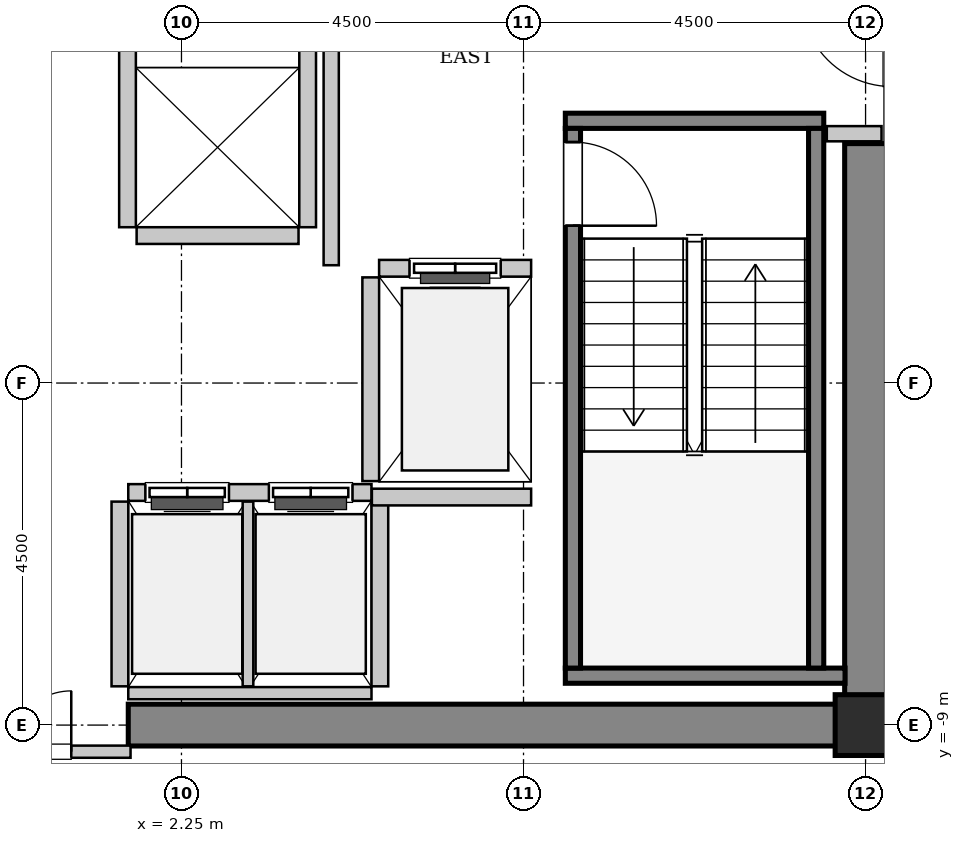
"""IFC4 building model, lengths in metres.
Left out: names, types, materials, properties, quantities, classifications, styles, units other than length and angle.
Written with IfcOpenShell. Run it as: python <this file> out.ifc"""

import sys

from ifc_helpers import new_model, si_unit, direction, frame, frame_2d, origin, origin_2d, place, context, subcontext, project, spatial, rectangle, hollow_rectangle, extrude, source, transform, mapped, element, fill, save


model = new_model("IFC4")
c1 = context("Model", 3, precision=1e-05, world=origin(), true_north=direction((0.0, 1.0)))
c2 = subcontext(c1, "Body", "Model", "MODEL_VIEW")
j1 = project(units=[si_unit("LENGTHUNIT", "METRE"), si_unit("PLANEANGLEUNIT", "RADIAN")], contexts=[c1])
p1 = place(None, origin())
s1 = spatial("IfcSite", under=j1, at=p1, CompositionType="ELEMENT")
p2 = place(p1, origin())
s2 = spatial("IfcBuilding", under=s1, at=p2, CompositionType="ELEMENT")
p3 = place(p2, frame((0.0, 0.0, 190.6)))
s3 = spatial("IfcBuildingStorey", under=s2, at=p3, CompositionType="ELEMENT", Elevation=190.6)
m1 = source(origin(), c2, "Body", "SweptSolid", [
    extrude(rectangle(XDim=9.975, YDim=0.55, at=frame_2d((4.987, 0.0))), origin(), (0.0, 0.0, 1.0), 3.8),
])
p4 = place(p3, frame((1.55, -9.0, 0.0), z_axis=(0.0, 0.0, 1.0), x_axis=(1.0, 0.0, 0.0)))
e1 = element("IfcWall", 1, at=p4, inside=s3, PredefinedType="SHEAR", context=c2, shape_type="MappedRepresentation", body=[
    mapped(m1, transform((0.0, 0.0, 0.0), x_axis=(1.0, 0.0, 0.0), y_axis=(0.0, 1.0, 0.0), z_axis=(0.0, 0.0, 1.0), scale=1.0)),
])
m2 = source(origin(), c2, "Body", "SweptSolid", [
    extrude(rectangle(XDim=7.375, YDim=0.55, at=frame_2d((3.688, 0.0))), origin(), (0.0, 0.0, 1.0), 3.8),
])
p5 = place(p3, frame((11.25, -8.725, 0.0), z_axis=(0.0, 0.0, 1.0), x_axis=(0.0, 1.0, 0.0)))
e2 = element("IfcWall", 2, at=p5, inside=s3, PredefinedType="SHEAR", context=c2, shape_type="MappedRepresentation", body=[
    mapped(m2, transform((0.0, 0.0, 0.0), x_axis=(1.0, 0.0, 0.0), y_axis=(0.0, 1.0, 0.0), z_axis=(0.0, 0.0, 1.0), scale=1.0)),
])
m3 = source(origin(), c2, "Body", "SweptSolid", [
    extrude(hollow_rectangle(XDim=0.8, YDim=0.8, WallThickness=0.04, InnerFilletRadius=0.04, OuterFilletRadius=0.08, at=origin_2d()), origin(), (0.0, 0.0, 1.0), 3.8),
])
p6 = place(p3, frame((11.25, -9.0, 0.0), z_axis=(0.0, 0.0, 1.0), x_axis=(1.0, 0.0, 0.0)))
e3 = element("IfcColumn", 3, at=p6, inside=s3, PredefinedType="COLUMN", context=c2, shape_type="MappedRepresentation", body=[
    mapped(m3, transform((0.0, 0.0, 0.0), x_axis=(1.0, 0.0, 0.0), y_axis=(0.0, 1.0, 0.0), z_axis=(0.0, 0.0, 1.0), scale=1.0)),
])
m4 = source(origin(), c2, "Body", "SweptSolid", [
    extrude(rectangle(XDim=3.4, YDim=0.2, at=frame_2d((1.7, 0.0))), origin(), (0.0, 0.0, 1.0), 3.8),
])
p7 = place(p3, frame((7.3, -1.05, 0.0), z_axis=(0.0, 0.0, 1.0), x_axis=(1.0, 0.0, 0.0)))
e4 = element("IfcWall", 4, at=p7, inside=s3, PredefinedType="SOLIDWALL", context=c2, shape_type="MappedRepresentation", body=[
    mapped(m4, transform((0.0, 0.0, 0.0), x_axis=(1.0, 0.0, 0.0), y_axis=(0.0, 1.0, 0.0), z_axis=(0.0, 0.0, 1.0), scale=1.0)),
])
m5 = source(origin(), c2, "Body", "SweptSolid", [
    extrude(rectangle(XDim=3.68, YDim=0.2, at=frame_2d((1.84, 0.0))), origin(), (0.0, 0.0, 1.0), 3.8),
])
p8 = place(p3, frame((7.3, -8.35, 0.0), z_axis=(0.0, 0.0, 1.0), x_axis=(1.0, 0.0, 0.0)))
e5 = element("IfcWall", 5, at=p8, inside=s3, PredefinedType="SOLIDWALL", context=c2, shape_type="MappedRepresentation", body=[
    mapped(m5, transform((0.0, 0.0, 0.0), x_axis=(1.0, 0.0, 0.0), y_axis=(0.0, 1.0, 0.0), z_axis=(0.0, 0.0, 1.0), scale=1.0)),
])
m6 = source(origin(), c2, "Body", "SweptSolid", [
    extrude(rectangle(XDim=7.1, YDim=0.2, at=frame_2d((3.55, 0.0))), origin(), (0.0, 0.0, 1.0), 3.8),
])
p9 = place(p3, frame((7.4, -1.15, 0.0), z_axis=(0.0, 0.0, 1.0), x_axis=(0.0, -1.0, 0.0)))
e6 = element("IfcWall", 6, at=p9, inside=s3, PredefinedType="SOLIDWALL", context=c2, shape_type="MappedRepresentation", body=[
    mapped(m6, transform((0.0, 0.0, 0.0), x_axis=(1.0, 0.0, 0.0), y_axis=(0.0, 1.0, 0.0), z_axis=(0.0, 0.0, 1.0), scale=1.0)),
])
p10 = place(p9, frame((0.18, 0.0, 0.0)))
e7 = element("IfcOpeningElement", 7, at=p10, cuts=e6, PredefinedType="OPENING", context=c2, shape_type="SweptSolid", body=[
    extrude(rectangle(XDim=1.1, YDim=2.15, at=frame_2d((0.55, 1.075))), frame((0.0, 0.11, 0.0), z_axis=(0.0, -1.0, 0.0), x_axis=(1.0, 0.0, 0.0)), (0.0, 0.0, 1.0), 0.22),
])
p11 = place(p3, frame((10.6, -1.15, 0.0), z_axis=(0.0, 0.0, 1.0), x_axis=(0.0, -1.0, 0.0)))
e8 = element("IfcWall", 8, at=p11, inside=s3, PredefinedType="SOLIDWALL", context=c2, shape_type="MappedRepresentation", body=[
    mapped(m6, transform((0.0, 0.0, 0.0), x_axis=(1.0, 0.0, 0.0), y_axis=(0.0, 1.0, 0.0), z_axis=(0.0, 0.0, 1.0), scale=1.0)),
])
m7 = source(origin(), c2, "Body", "SweptSolid", [
    extrude(rectangle(XDim=2.0, YDim=0.22, at=frame_2d((1.0, 0.0))), origin(), (0.0, 0.0, 1.0), 3.535),
])
p12 = place(p3, frame((6.85, -2.99, 0.0), z_axis=(0.0, 0.0, 1.0), x_axis=(-1.0, 0.0, 0.0)))
e9 = element("IfcWall", 9, at=p12, inside=s3, PredefinedType="SOLIDWALL", context=c2, shape_type="MappedRepresentation", body=[
    mapped(m7, transform((0.0, 0.0, 0.0), x_axis=(1.0, 0.0, 0.0), y_axis=(0.0, 1.0, 0.0), z_axis=(0.0, 0.0, 1.0), scale=1.0)),
])
p13 = place(p12, frame((0.4, 0.0, 0.0)))
e10 = element("IfcOpeningElement", 10, at=p13, cuts=e9, PredefinedType="OPENING", context=c2, shape_type="SweptSolid", body=[
    extrude(rectangle(XDim=1.2, YDim=2.2, at=frame_2d((0.6, 1.1))), frame((0.0, 0.12, 0.0), z_axis=(0.0, -1.0, 0.0), x_axis=(1.0, 0.0, 0.0)), (0.0, 0.0, 1.0), 0.24),
])
m8 = source(origin(), c2, "Body", "SweptSolid", [
    extrude(rectangle(XDim=2.68, YDim=0.22, at=frame_2d((1.34, 0.0))), origin(), (0.0, 0.0, 1.0), 3.535),
])
p14 = place(p3, frame((4.74, -3.11, 0.0), z_axis=(0.0, 0.0, 1.0), x_axis=(0.0, -1.0, 0.0)))
e11 = element("IfcWall", 11, at=p14, inside=s3, PredefinedType="SOLIDWALL", context=c2, shape_type="MappedRepresentation", body=[
    mapped(m8, transform((0.0, 0.0, 0.0), x_axis=(1.0, 0.0, 0.0), y_axis=(0.0, 1.0, 0.0), z_axis=(0.0, 0.0, 1.0), scale=1.0)),
])
m9 = source(origin(), c2, "Body", "SweptSolid", [
    extrude(rectangle(XDim=3.2, YDim=0.22, at=frame_2d((1.6, 0.0))), origin(), (0.0, 0.0, 1.0), 3.535),
])
p15 = place(p3, frame((4.75, -5.94, 0.0), z_axis=(0.0, 0.0, 1.0), x_axis=(-1.0, 0.0, 0.0)))
e12 = element("IfcWall", 12, at=p15, inside=s3, PredefinedType="SOLIDWALL", context=c2, shape_type="MappedRepresentation", body=[
    mapped(m9, transform((0.0, 0.0, 0.0), x_axis=(1.0, 0.0, 0.0), y_axis=(0.0, 1.0, 0.0), z_axis=(0.0, 0.0, 1.0), scale=1.0)),
])
p16 = place(p15, frame((1.875, 0.0, 0.0)))
e13 = element("IfcOpeningElement", 13, at=p16, cuts=e12, PredefinedType="OPENING", context=c2, shape_type="SweptSolid", body=[
    extrude(rectangle(XDim=1.1, YDim=2.2, at=frame_2d((0.55, 1.1))), frame((0.0, 0.12, 0.0), z_axis=(0.0, -1.0, 0.0), x_axis=(1.0, 0.0, 0.0)), (0.0, 0.0, 1.0), 0.24),
])
p17 = place(p15, frame((0.25, 0.0, 0.0)))
e14 = element("IfcOpeningElement", 14, at=p17, cuts=e12, PredefinedType="OPENING", context=c2, shape_type="SweptSolid", body=[
    extrude(rectangle(XDim=1.1, YDim=2.2, at=frame_2d((0.55, 1.1))), frame((0.0, 0.12, 0.0), z_axis=(0.0, -1.0, 0.0), x_axis=(1.0, 0.0, 0.0)), (0.0, 0.0, 1.0), 0.24),
])
m10 = source(origin(), c2, "Body", "SweptSolid", [
    extrude(rectangle(XDim=3.2, YDim=0.16, at=frame_2d((1.6, 0.0))), origin(), (0.0, 0.0, 1.0), 2.425),
])
p18 = place(p3, frame((1.55, -8.58, 0.0), z_axis=(0.0, 0.0, 1.0), x_axis=(1.0, 0.0, 0.0)))
e15 = element("IfcWall", 15, at=p18, inside=s3, PredefinedType="PARTITIONING", context=c2, shape_type="MappedRepresentation", body=[
    mapped(m10, transform((0.0, 0.0, 0.0), x_axis=(1.0, 0.0, 0.0), y_axis=(0.0, 1.0, 0.0), z_axis=(0.0, 0.0, 1.0), scale=1.0)),
])
m11 = source(origin(), c2, "Body", "SweptSolid", [
    extrude(rectangle(XDim=2.43, YDim=0.22, at=frame_2d((1.215, 0.0))), origin(), (0.0, 0.0, 1.0), 3.535),
])
p19 = place(p3, frame((1.44, -6.06, 0.0), z_axis=(0.0, 0.0, 1.0), x_axis=(0.0, -1.0, 0.0)))
e16 = element("IfcWall", 16, at=p19, inside=s3, PredefinedType="SOLIDWALL", context=c2, shape_type="MappedRepresentation", body=[
    mapped(m11, transform((0.0, 0.0, 0.0), x_axis=(1.0, 0.0, 0.0), y_axis=(0.0, 1.0, 0.0), z_axis=(0.0, 0.0, 1.0), scale=1.0)),
])
m12 = source(origin(), c2, "Body", "SweptSolid", [
    extrude(rectangle(XDim=2.43, YDim=0.14, at=frame_2d((1.215, 0.0))), origin(), (0.0, 0.0, 1.0), 3.535),
])
p20 = place(p3, frame((3.125, -8.49, 0.0), z_axis=(0.0, 0.0, 1.0), x_axis=(0.0, 1.0, 0.0)))
e17 = element("IfcWall", 17, at=p20, inside=s3, PredefinedType="PARTITIONING", context=c2, shape_type="MappedRepresentation", body=[
    mapped(m12, transform((0.0, 0.0, 0.0), x_axis=(1.0, 0.0, 0.0), y_axis=(0.0, 1.0, 0.0), z_axis=(0.0, 0.0, 1.0), scale=1.0)),
])
p21 = place(p3, frame((4.86, -8.49, 0.0), z_axis=(0.0, 0.0, 1.0), x_axis=(0.0, 1.0, 0.0)))
e18 = element("IfcWall", 18, at=p21, inside=s3, PredefinedType="SOLIDWALL", context=c2, shape_type="MappedRepresentation", body=[
    mapped(m11, transform((0.0, 0.0, 0.0), x_axis=(1.0, 0.0, 0.0), y_axis=(0.0, 1.0, 0.0), z_axis=(0.0, 0.0, 1.0), scale=1.0)),
])
m13 = source(origin(), c2, "Body", "SweptSolid", [
    extrude(rectangle(XDim=4.9, YDim=0.22, at=frame_2d((2.45, 0.0))), origin(), (0.0, 0.0, 1.0), 3.535),
])
for number, where, z_axis, x_axis in (
    (19, (1.54, 2.45, 0.0), (0.0, 0.0, 1.0), (0.0, -1.0, 0.0)),
    (20, (3.91, -2.45, 0.0), (0.0, 0.0, 1.0), (0.0, 1.0, 0.0)),
):
    element("IfcWall", number, at=place(p3, frame(where, z_axis=z_axis, x_axis=x_axis)), inside=s3, PredefinedType="SOLIDWALL", context=c2, shape_type="MappedRepresentation", body=[
        mapped(m13, transform((0.0, 0.0, 0.0), x_axis=(1.0, 0.0, 0.0), y_axis=(0.0, 1.0, 0.0), z_axis=(0.0, 0.0, 1.0), scale=1.0)),
    ])
m14 = source(origin(), c2, "Body", "SweptSolid", [
    extrude(rectangle(XDim=2.13, YDim=0.22, at=frame_2d((1.065, 0.0))), origin(), (0.0, 0.0, 1.0), 3.535),
])
p22 = place(p3, frame((1.66, -2.56, 0.0), z_axis=(0.0, 0.0, 1.0), x_axis=(1.0, 0.0, 0.0)))
e21 = element("IfcWall", 21, at=p22, inside=s3, PredefinedType="SOLIDWALL", context=c2, shape_type="MappedRepresentation", body=[
    mapped(m14, transform((0.0, 0.0, 0.0), x_axis=(1.0, 0.0, 0.0), y_axis=(0.0, 1.0, 0.0), z_axis=(0.0, 0.0, 1.0), scale=1.0)),
])
m15 = source(origin(), c2, "Body", "SweptSolid", [
    extrude(rectangle(XDim=2.095, YDim=0.22, at=frame_2d((1.048, 0.0))), origin(), (0.0, 0.0, 1.0), 3.535),
])
p23 = place(p3, frame((4.755, -6.0, 0.0), z_axis=(0.0, 0.0, 1.0), x_axis=(1.0, 0.0, 0.0)))
e22 = element("IfcWall", 22, at=p23, inside=s3, PredefinedType="SOLIDWALL", context=c2, shape_type="MappedRepresentation", body=[
    mapped(m15, transform((0.0, 0.0, 0.0), x_axis=(1.0, 0.0, 0.0), y_axis=(0.0, 1.0, 0.0), z_axis=(0.0, 0.0, 1.0), scale=1.0)),
])
m16 = source(origin(), c2, "Body", "SweptSolid", [
    extrude(rectangle(XDim=5.9, YDim=0.2, at=frame_2d((2.95, 0.0))), origin(), (0.0, 0.0, 1.0), 3.535),
])
p24 = place(p3, frame((4.22, -2.95, 0.0), z_axis=(0.0, 0.0, 1.0), x_axis=(0.0, 1.0, 0.0)))
e23 = element("IfcWall", 23, at=p24, inside=s3, PredefinedType="PARTITIONING", context=c2, shape_type="MappedRepresentation", body=[
    mapped(m16, transform((0.0, 0.0, 0.0), x_axis=(1.0, 0.0, 0.0), y_axis=(0.0, 1.0, 0.0), z_axis=(0.0, 0.0, 1.0), scale=1.0)),
])
m17 = source(origin(), c2, "Body", "SweptSolid", [
    extrude(rectangle(XDim=0.72, YDim=0.2, at=frame_2d((0.36, 0.0))), origin(), (0.0, 0.0, 1.0), 3.535),
])
p25 = place(p3, frame((10.74, -1.22, 0.0), z_axis=(0.0, 0.0, 1.0), x_axis=(1.0, 0.0, 0.0)))
e24 = element("IfcWall", 24, at=p25, inside=s3, PredefinedType="PARTITIONING", context=c2, shape_type="MappedRepresentation", body=[
    mapped(m17, transform((0.0, 0.0, 0.0), x_axis=(1.0, 0.0, 0.0), y_axis=(0.0, 1.0, 0.0), z_axis=(0.0, 0.0, 1.0), scale=1.0)),
])
m18 = source(origin(), c2, "Body", "SweptSolid", [
    extrude(rectangle(XDim=3.16, YDim=0.16, at=frame_2d((1.58, 0.0))), origin(), (0.0, 0.0, 1.0), 2.425),
])
p26 = place(p3, frame((-1.58, -9.35, 0.0), z_axis=(0.0, 0.0, 1.0), x_axis=(1.0, 0.0, 0.0)))
e25 = element("IfcWall", 25, at=p26, inside=s3, PredefinedType="PARTITIONING", context=c2, shape_type="MappedRepresentation", body=[
    mapped(m18, transform((0.0, 0.0, 0.0), x_axis=(1.0, 0.0, 0.0), y_axis=(0.0, 1.0, 0.0), z_axis=(0.0, 0.0, 1.0), scale=1.0)),
])
p27 = place(p26, frame((0.78, 0.0, 0.0)))
e26 = element("IfcOpeningElement", 26, at=p27, cuts=e25, PredefinedType="OPENING", context=c2, shape_type="SweptSolid", body=[
    extrude(rectangle(XDim=1.6, YDim=2.3, at=frame_2d((0.8, 1.15))), frame((0.0, 0.09, 0.0), z_axis=(0.0, -1.0, 0.0), x_axis=(1.0, 0.0, 0.0)), (0.0, 0.0, 1.0), 0.18),
])
m19 = source(origin(), c2, "Body", "SweptSolid", [
    extrude(rectangle(XDim=1.1, YDim=2.15, at=frame_2d((0.55, 1.075))), frame((0.0, 0.025, 0.0), z_axis=(0.0, -1.0, 0.0), x_axis=(1.0, 0.0, 0.0)), (0.0, 0.0, 1.0), 0.05),
])
p28 = place(p10, origin())
e27 = element("IfcDoor", 27, at=p28, inside=s3, OperationType="SINGLE_SWING_RIGHT", PredefinedType="DOOR", context=c2, shape_type="MappedRepresentation", body=[
    mapped(m19, transform((0.0, 0.0, 0.0), x_axis=(1.0, 0.0, 0.0), y_axis=(0.0, 1.0, 0.0), z_axis=(0.0, 0.0, 1.0), scale=1.0)),
])
fill(e7, e27)
m20 = source(origin(), c2, "Body", "SweptSolid", [
    extrude(rectangle(XDim=1.2, YDim=2.2, at=frame_2d((0.6, 1.1))), frame((0.0, 0.025, 0.0), z_axis=(0.0, -1.0, 0.0), x_axis=(1.0, 0.0, 0.0)), (0.0, 0.0, 1.0), 0.05),
])
p29 = place(p13, origin())
e28 = element("IfcDoor", 28, at=p29, inside=s3, OperationType="SLIDING_TO_LEFT", PredefinedType="DOOR", context=c2, shape_type="MappedRepresentation", body=[
    mapped(m20, transform((0.0, 0.0, 0.0), x_axis=(1.0, 0.0, 0.0), y_axis=(0.0, 1.0, 0.0), z_axis=(0.0, 0.0, 1.0), scale=1.0)),
])
fill(e10, e28)
m21 = source(origin(), c2, "Body", "SweptSolid", [
    extrude(rectangle(XDim=1.1, YDim=2.2, at=frame_2d((0.55, 1.1))), frame((0.0, 0.025, 0.0), z_axis=(0.0, -1.0, 0.0), x_axis=(1.0, 0.0, 0.0)), (0.0, 0.0, 1.0), 0.05),
])
p30 = place(p16, origin())
e29 = element("IfcDoor", 29, at=p30, inside=s3, OperationType="DOUBLE_DOOR_SLIDING", PredefinedType="DOOR", context=c2, shape_type="MappedRepresentation", body=[
    mapped(m21, transform((0.0, 0.0, 0.0), x_axis=(1.0, 0.0, 0.0), y_axis=(0.0, 1.0, 0.0), z_axis=(0.0, 0.0, 1.0), scale=1.0)),
])
fill(e13, e29)
p31 = place(p17, origin())
e30 = element("IfcDoor", 30, at=p31, inside=s3, OperationType="DOUBLE_DOOR_SLIDING", PredefinedType="DOOR", context=c2, shape_type="MappedRepresentation", body=[
    mapped(m21, transform((0.0, 0.0, 0.0), x_axis=(1.0, 0.0, 0.0), y_axis=(0.0, 1.0, 0.0), z_axis=(0.0, 0.0, 1.0), scale=1.0)),
])
fill(e14, e30)
m22 = source(origin(), c2, "Body", "SweptSolid", [
    extrude(rectangle(XDim=1.6, YDim=2.3, at=frame_2d((0.8, 1.15))), frame((0.0, 0.025, 0.0), z_axis=(0.0, -1.0, 0.0), x_axis=(1.0, 0.0, 0.0)), (0.0, 0.0, 1.0), 0.05),
])
p32 = place(p27, origin())
e31 = element("IfcDoor", 31, at=p32, inside=s3, OperationType="DOUBLE_DOOR_SINGLE_SWING", PredefinedType="DOOR", context=c2, shape_type="MappedRepresentation", body=[
    mapped(m22, transform((0.0, 0.0, 0.0), x_axis=(1.0, 0.0, 0.0), y_axis=(0.0, 1.0, 0.0), z_axis=(0.0, 0.0, 1.0), scale=1.0)),
])
fill(e26, e31)
save(model, sys.argv[1])
